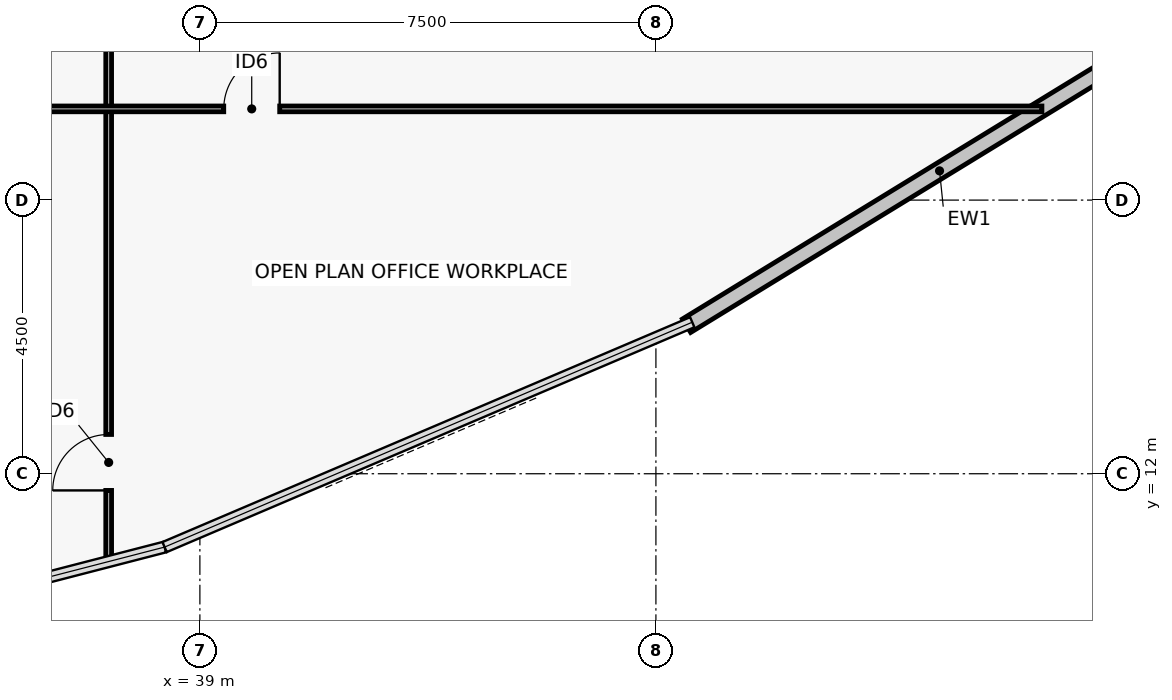
"""IFC4 building model, lengths in metres.
Left out: names, types, materials, properties, quantities, classifications, styles, units other than length and angle.
Written with IfcOpenShell. Run it as: python <this file> out.ifc"""

import sys

from ifc_helpers import new_model, si_unit, direction, frame, frame_2d, origin, place, context, subcontext, project, spatial, rectangle, extrude, element, fill, save


model = new_model("IFC4")
c1 = context("Model", 3, precision=1e-05, world=origin(), true_north=direction((0.0, 1.0)))
c2 = subcontext(c1, "Body", "Model", "MODEL_VIEW")
j1 = project(units=[si_unit("LENGTHUNIT", "METRE"), si_unit("PLANEANGLEUNIT", "RADIAN")], contexts=[c1])
p1 = place(None, origin())
s1 = spatial("IfcSite", under=j1, at=p1, CompositionType="ELEMENT")
p2 = place(p1, origin())
s2 = spatial("IfcBuilding", under=s1, at=p2, CompositionType="ELEMENT")
p3 = place(p2, frame((0.0, 0.0, 64.8)))
s3 = spatial("IfcBuildingStorey", under=s2, at=p3, CompositionType="ELEMENT", Elevation=64.8)
p4 = place(p3, frame((55.326, 19.528, 0.0), z_axis=(0.0, 0.0, 1.0), x_axis=(-0.852895644524, -0.522081430001, 0.0)))
e1 = element("IfcWall", 1, at=p4, inside=s3, PredefinedType="PARTITIONING", context=c2, shape_type="SweptSolid", body=[
    extrude(rectangle(XDim=9.757, YDim=0.26, at=frame_2d((4.878, 0.0))), origin(), (0.0, 0.0, 1.0), 3.44),
])
p5 = place(p3, frame((37.5, 10.546, 0.0), z_axis=(0.0, 0.0, 1.0), x_axis=(0.0, 1.0, 0.0)))
e2 = element("IfcWall", 2, at=p5, inside=s3, PredefinedType="PARTITIONING", context=c2, shape_type="SweptSolid", body=[
    extrude(rectangle(XDim=22.909, YDim=0.095, at=frame_2d((11.454, 0.0))), origin(), (0.0, 0.0, 1.0), 2.57),
])
p6 = place(p5, frame((1.18, 0.0, 0.0)))
e3 = element("IfcOpeningElement", 3, at=p6, cuts=e2, PredefinedType="OPENING", context=c2, shape_type="SweptSolid", body=[
    extrude(rectangle(XDim=0.92, YDim=2.05, at=frame_2d((0.46, 1.025))), frame((0.0, 0.057, 0.0), z_axis=(0.0, -1.0, 0.0), x_axis=(1.0, 0.0, 0.0)), (0.0, 0.0, 1.0), 0.115),
])
p7 = place(p5, frame((10.145, 0.0, 0.0)))
e4 = element("IfcOpeningElement", 4, at=p7, cuts=e2, PredefinedType="OPENING", context=c2, shape_type="SweptSolid", body=[
    extrude(rectangle(XDim=0.92, YDim=2.05, at=frame_2d((0.46, 1.025))), frame((0.0, 0.057, 0.0), z_axis=(0.0, -1.0, 0.0), x_axis=(1.0, 0.0, 0.0)), (0.0, 0.0, 1.0), 0.115),
])
p8 = place(p5, frame((20.809, 0.0, 0.0)))
e5 = element("IfcOpeningElement", 5, at=p8, cuts=e2, PredefinedType="OPENING", context=c2, shape_type="SweptSolid", body=[
    extrude(rectangle(XDim=0.92, YDim=2.05, at=frame_2d((0.46, 1.025))), frame((0.0, 0.057, 0.0), z_axis=(0.0, -1.0, 0.0), x_axis=(1.0, 0.0, 0.0)), (0.0, 0.0, 1.0), 0.115),
])
p9 = place(p3, frame((33.77, 18.0, 0.0), z_axis=(0.0, 0.0, 1.0), x_axis=(1.0, 0.0, 0.0)))
e6 = element("IfcWall", 6, at=p9, inside=s3, PredefinedType="PARTITIONING", context=c2, shape_type="SweptSolid", body=[
    extrude(rectangle(XDim=19.078, YDim=0.095, at=frame_2d((9.539, 0.0))), origin(), (0.0, 0.0, 1.0), 2.57),
])
p10 = place(p9, frame((5.623, 0.0, 0.0)))
e7 = element("IfcOpeningElement", 7, at=p10, cuts=e6, PredefinedType="OPENING", context=c2, shape_type="SweptSolid", body=[
    extrude(rectangle(XDim=0.92, YDim=2.05, at=frame_2d((0.46, 1.025))), frame((0.0, 0.057, 0.0), z_axis=(0.0, -1.0, 0.0), x_axis=(1.0, 0.0, 0.0)), (0.0, 0.0, 1.0), 0.115),
])
p11 = place(p6, origin())
e8 = element("IfcDoor", 8, at=p11, inside=s3, OperationType="SINGLE_SWING_LEFT", PredefinedType="DOOR", context=c2, shape_type="SweptSolid", body=[
    extrude(rectangle(XDim=0.92, YDim=2.05, at=frame_2d((0.46, 1.025))), frame((0.0, 0.025, 0.0), z_axis=(0.0, -1.0, 0.0), x_axis=(1.0, 0.0, 0.0)), (0.0, 0.0, 1.0), 0.05),
])
fill(e3, e8)
p12 = place(p10, origin())
e9 = element("IfcDoor", 9, at=p12, inside=s3, OperationType="SINGLE_SWING_RIGHT", PredefinedType="DOOR", context=c2, shape_type="SweptSolid", body=[
    extrude(rectangle(XDim=0.92, YDim=2.05, at=frame_2d((0.46, 1.025))), frame((0.0, 0.025, 0.0), z_axis=(0.0, -1.0, 0.0), x_axis=(1.0, 0.0, 0.0)), (0.0, 0.0, 1.0), 0.05),
])
fill(e7, e9)
save(model, sys.argv[1])
